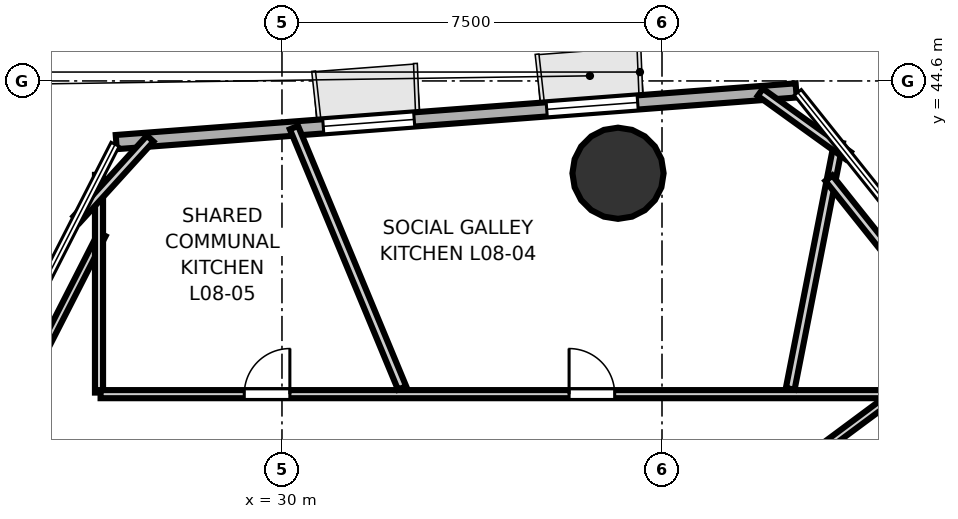
"""IFC4 building model, lengths in metres.
Left out: names, types, materials, properties, quantities, classifications, styles, units other than length and angle.
Written with IfcOpenShell. Run it as: python <this file> out.ifc"""

import sys

from ifc_helpers import new_model, si_unit, direction, frame, frame_2d, origin, origin_2d, place, context, subcontext, project, spatial, rectangle, hollow_circle, extrude, element, fill, save


model = new_model("IFC4")
c1 = context("Model", 3, precision=1e-05, world=origin(), true_north=direction((0.0, 1.0)))
c2 = subcontext(c1, "Body", "Model", "MODEL_VIEW")
j1 = project(units=[si_unit("LENGTHUNIT", "METRE"), si_unit("PLANEANGLEUNIT", "RADIAN")], contexts=[c1])
p1 = place(None, origin())
s1 = spatial("IfcSite", under=j1, at=p1, CompositionType="ELEMENT")
p2 = place(p1, origin())
s2 = spatial("IfcBuilding", under=s1, at=p2, CompositionType="ELEMENT")
p3 = place(p2, frame((0.0, 0.0, 36.8)))
s3 = spatial("IfcBuildingStorey", under=s2, at=p3, CompositionType="ELEMENT", Elevation=36.8)
p4 = place(p3, frame((36.632, 42.778, 0.0), z_axis=(0.0, 0.0, 1.0), x_axis=(1.0, 0.0, 0.0)))
e1 = element("IfcColumn", 1, at=p4, inside=s3, PredefinedType="COLUMN", context=c2, shape_type="SweptSolid", body=[
    extrude(hollow_circle(Radius=0.9, WallThickness=0.045, at=origin_2d()), origin(), (0.0, 0.0, 1.0), 3.7),
])
p5 = place(p3, frame((40.147, 44.413, 0.0), z_axis=(0.0, 0.0, 1.0), x_axis=(-0.997124396063, -0.07578217981, 0.0)))
e2 = element("IfcWall", 2, at=p5, inside=s3, PredefinedType="SOLIDWALL", context=c2, shape_type="SweptSolid", body=[
    extrude(rectangle(XDim=13.457, YDim=0.28, at=frame_2d((6.728, 0.0))), origin(), (0.0, 0.0, 1.0), 3.52),
])
p6 = place(p5, frame((3.137, 0.0, 0.85)))
e3 = element("IfcOpeningElement", 3, at=p6, cuts=e2, PredefinedType="OPENING", context=c2, shape_type="SweptSolid", body=[
    extrude(rectangle(XDim=1.8, YDim=2.1, at=frame_2d((0.9, 1.05))), frame((0.0, 0.15, 0.0), z_axis=(0.0, -1.0, 0.0), x_axis=(1.0, 0.0, 0.0)), (0.0, 0.0, 1.0), 0.3),
])
p7 = place(p5, frame((7.56, 0.0, 0.85)))
e4 = element("IfcOpeningElement", 4, at=p7, cuts=e2, PredefinedType="OPENING", context=c2, shape_type="SweptSolid", body=[
    extrude(rectangle(XDim=1.8, YDim=2.1, at=frame_2d((0.9, 1.05))), frame((0.0, 0.15, 0.0), z_axis=(0.0, -1.0, 0.0), x_axis=(1.0, 0.0, 0.0)), (0.0, 0.0, 1.0), 0.3),
])
p8 = place(p3, frame((23.578, 35.951, 0.0), z_axis=(0.0, 0.0, 1.0), x_axis=(0.454592450263, 0.890699558866, 0.0)))
e5 = element("IfcWall", 5, at=p8, inside=s3, PredefinedType="PARTITIONING", context=c2, shape_type="SweptSolid", body=[
    extrude(rectangle(XDim=6.313, YDim=0.16, at=frame_2d((3.156, 0.0))), origin(), (0.0, 0.0, 1.0), 2.84),
])
p9 = place(p3, frame((26.389, 42.746, 0.0), z_axis=(0.0, 0.0, 1.0), x_axis=(0.0, -1.0, 0.0)))
e6 = element("IfcWall", 6, at=p9, inside=s3, PredefinedType="PARTITIONING", context=c2, shape_type="SweptSolid", body=[
    extrude(rectangle(XDim=4.296, YDim=0.16, at=frame_2d((2.148, 0.0))), origin(), (0.0, 0.0, 1.0), 2.84),
])
p10 = place(p3, frame((26.42, 38.419, 0.0), z_axis=(0.0, 0.0, 1.0), x_axis=(1.0, 0.0, 0.0)))
e7 = element("IfcWall", 7, at=p10, inside=s3, PredefinedType="PARTITIONING", context=c2, shape_type="SweptSolid", body=[
    extrude(rectangle(XDim=15.783, YDim=0.16, at=frame_2d((7.892, 0.0))), origin(), (0.0, 0.0, 1.0), 2.798),
])
p11 = place(p10, frame((9.246, 0.0, 0.0)))
e8 = element("IfcOpeningElement", 8, at=p11, cuts=e7, PredefinedType="OPENING", context=c2, shape_type="SweptSolid", body=[
    extrude(rectangle(XDim=0.9, YDim=2.1, at=frame_2d((0.45, 1.05))), frame((0.0, 0.09, 0.0), z_axis=(0.0, -1.0, 0.0), x_axis=(1.0, 0.0, 0.0)), (0.0, 0.0, 1.0), 0.18),
])
p12 = place(p10, frame((2.836, 0.0, 0.0)))
e9 = element("IfcOpeningElement", 9, at=p12, cuts=e7, PredefinedType="OPENING", context=c2, shape_type="SweptSolid", body=[
    extrude(rectangle(XDim=0.9, YDim=2.1, at=frame_2d((0.45, 1.05))), frame((0.0, 0.09, 0.0), z_axis=(0.0, -1.0, 0.0), x_axis=(1.0, 0.0, 0.0)), (0.0, 0.0, 1.0), 0.18),
])
p13 = place(p3, frame((42.185, 38.475, 0.0), z_axis=(0.0, 0.0, 1.0), x_axis=(-0.802818467394, -0.596223538961, 0.0)))
e10 = element("IfcWall", 10, at=p13, inside=s3, PredefinedType="PARTITIONING", context=c2, shape_type="SweptSolid", body=[
    extrude(rectangle(XDim=2.953, YDim=0.16, at=frame_2d((1.477, 0.0))), origin(), (0.0, 0.0, 1.0), 2.798),
])
p14 = place(p3, frame((40.031, 38.524, 0.0), z_axis=(0.0, 0.0, 1.0), x_axis=(0.192440494931, 0.981308644571, 0.0)))
e11 = element("IfcWall", 11, at=p14, inside=s3, PredefinedType="PLUMBINGWALL", context=c2, shape_type="SweptSolid", body=[
    extrude(rectangle(XDim=4.958, YDim=0.175, at=frame_2d((2.479, 0.0))), origin(), (0.0, 0.0, 1.0), 2.798),
])
p15 = place(p3, frame((40.794, 42.681, 0.0), z_axis=(0.0, 0.0, 1.0), x_axis=(0.623977950445, -0.781441947529, 0.0)))
e12 = element("IfcWall", 12, at=p15, inside=s3, PredefinedType="PLUMBINGWALL", context=c2, shape_type="SweptSolid", body=[
    extrude(rectangle(XDim=11.588, YDim=0.175, at=frame_2d((5.794, 0.0))), origin(), (0.0, 0.0, 1.0), 2.095),
])
p16 = place(p3, frame((39.44, 44.376, 0.0), z_axis=(0.0, 0.0, 1.0), x_axis=(0.81138921051, -0.584506243822, 0.0)))
e13 = element("IfcWall", 13, at=p16, inside=s3, PredefinedType="PLUMBINGWALL", context=c2, shape_type="SweptSolid", body=[
    extrude(rectangle(XDim=2.138, YDim=0.175, at=frame_2d((1.069, 0.0))), origin(), (0.0, 0.0, 1.0), 2.84),
])
p17 = place(p3, frame((32.37, 38.542, 0.0), z_axis=(0.0, 0.0, 1.0), x_axis=(-0.383564864304, 0.923513938645, 0.0)))
e14 = element("IfcWall", 14, at=p17, inside=s3, PredefinedType="PLUMBINGWALL", context=c2, shape_type="SweptSolid", body=[
    extrude(rectangle(XDim=5.562, YDim=0.175, at=frame_2d((2.781, 0.0))), origin(), (0.0, 0.0, 1.0), 2.798),
])
p18 = place(p3, frame((25.952, 41.869, 0.0), z_axis=(0.0, 0.0, 1.0), x_axis=(0.672672793996, 0.739940073396, 0.0)))
e15 = element("IfcWall", 15, at=p18, inside=s3, PredefinedType="PLUMBINGWALL", context=c2, shape_type="SweptSolid", body=[
    extrude(rectangle(XDim=2.152, YDim=0.175, at=frame_2d((1.076, 0.0))), origin(), (0.0, 0.0, 1.0), 2.84),
])
p19 = place(p11, origin())
e16 = element("IfcDoor", 16, at=p19, inside=s3, OperationType="SINGLE_SWING_LEFT", PredefinedType="DOOR", context=c2, shape_type="SweptSolid", body=[
    extrude(rectangle(XDim=0.9, YDim=2.1, at=frame_2d((0.45, 1.05))), frame((0.0, 0.025, 0.0), z_axis=(0.0, -1.0, 0.0), x_axis=(1.0, 0.0, 0.0)), (0.0, 0.0, 1.0), 0.05),
])
fill(e8, e16)
p20 = place(p12, origin())
e17 = element("IfcDoor", 17, at=p20, inside=s3, OperationType="SINGLE_SWING_RIGHT", PredefinedType="DOOR", context=c2, shape_type="SweptSolid", body=[
    extrude(rectangle(XDim=0.9, YDim=2.1, at=frame_2d((0.45, 1.05))), frame((0.0, 0.025, 0.0), z_axis=(0.0, -1.0, 0.0), x_axis=(1.0, 0.0, 0.0)), (0.0, 0.0, 1.0), 0.05),
])
fill(e9, e17)
p21 = place(p6, origin())
e18 = element("IfcWindow", 18, at=p21, inside=s3, PartitioningType="SINGLE_PANEL", PredefinedType="WINDOW", context=c2, shape_type="SweptSolid", body=[
    extrude(rectangle(XDim=1.8, YDim=2.1, at=frame_2d((0.9, 1.05))), frame((0.0, 0.03, 0.0), z_axis=(0.0, -1.0, 0.0), x_axis=(1.0, 0.0, 0.0)), (0.0, 0.0, 1.0), 0.06),
])
fill(e3, e18)
p22 = place(p7, origin())
e19 = element("IfcWindow", 19, at=p22, inside=s3, PartitioningType="SINGLE_PANEL", PredefinedType="WINDOW", context=c2, shape_type="SweptSolid", body=[
    extrude(rectangle(XDim=1.8, YDim=2.1, at=frame_2d((0.9, 1.05))), frame((0.0, 0.03, 0.0), z_axis=(0.0, -1.0, 0.0), x_axis=(1.0, 0.0, 0.0)), (0.0, 0.0, 1.0), 0.06),
])
fill(e4, e19)
save(model, sys.argv[1])
